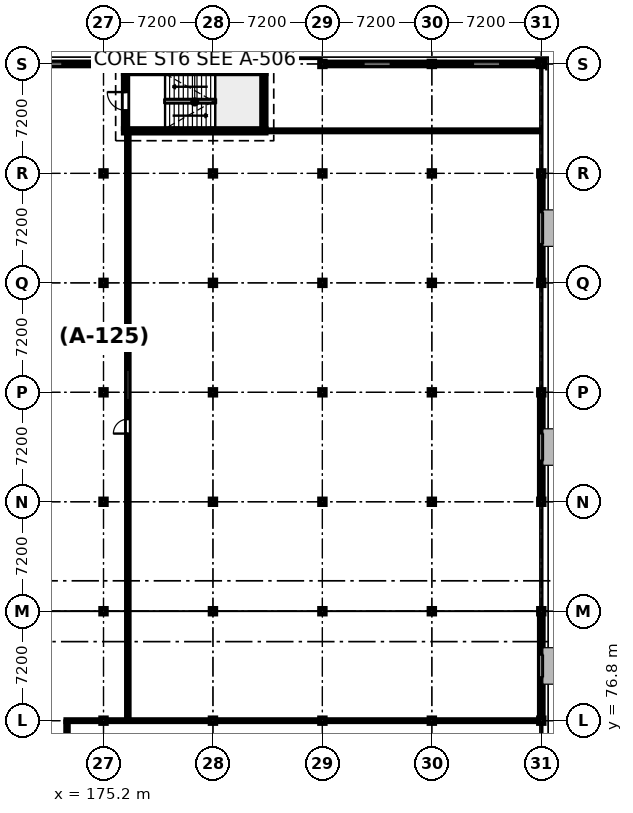
"""IFC4 building model, lengths in metres.
Left out: names, types, materials, properties, quantities, classifications, styles, units other than length and angle.
Written with IfcOpenShell. Run it as: python <this file> out.ifc"""

import sys

from ifc_helpers import new_model, si_unit, direction, frame, frame_2d, origin, origin_2d, place, context, subcontext, project, spatial, rectangle, i_section, extrude, element, fill, save


model = new_model("IFC4")
c1 = context("Model", 3, precision=1e-05, world=origin(), true_north=direction((0.0, 1.0)))
c2 = subcontext(c1, "Body", "Model", "MODEL_VIEW")
j1 = project(units=[si_unit("LENGTHUNIT", "METRE"), si_unit("PLANEANGLEUNIT", "RADIAN")], contexts=[c1])
p1 = place(None, origin())
s1 = spatial("IfcSite", under=j1, at=p1, CompositionType="ELEMENT")
p2 = place(p1, origin())
s2 = spatial("IfcBuilding", under=s1, at=p2, CompositionType="ELEMENT")
p3 = place(p2, frame((0.0, 0.0, 5.4)))
s3 = spatial("IfcBuildingStorey", under=s2, at=p3, CompositionType="ELEMENT", Elevation=5.4)
for number, where, z_axis, x_axis in (
    (1, (175.2, 76.8, 0.0), (0.0, 0.0, 1.0), (1.0, 0.0, 0.0)),
    (2, (175.2, 84.0, 0.0), (0.0, 0.0, 1.0), (1.0, 0.0, 0.0)),
    (3, (175.2, 91.2, 0.0), (0.0, 0.0, 1.0), (1.0, 0.0, 0.0)),
    (4, (175.2, 98.4, 0.0), (0.0, 0.0, 1.0), (1.0, 0.0, 0.0)),
    (5, (175.2, 105.6, 0.0), (0.0, 0.0, 1.0), (1.0, 0.0, 0.0)),
    (6, (175.2, 112.8, 0.0), (0.0, 0.0, 1.0), (1.0, 0.0, 0.0)),
    (7, (175.2, 120.0, 0.0), (0.0, 0.0, 1.0), (1.0, 0.0, 0.0)),
    (8, (182.4, 76.8, 0.0), (0.0, 0.0, 1.0), (1.0, 0.0, 0.0)),
    (9, (182.4, 84.0, 0.0), (0.0, 0.0, 1.0), (1.0, 0.0, 0.0)),
    (10, (182.4, 91.2, 0.0), (0.0, 0.0, 1.0), (1.0, 0.0, 0.0)),
    (11, (182.4, 98.4, 0.0), (0.0, 0.0, 1.0), (1.0, 0.0, 0.0)),
    (12, (182.4, 105.6, 0.0), (0.0, 0.0, 1.0), (1.0, 0.0, 0.0)),
    (13, (182.4, 112.8, 0.0), (0.0, 0.0, 1.0), (1.0, 0.0, 0.0)),
    (14, (182.4, 120.0, 0.0), (0.0, 0.0, 1.0), (1.0, 0.0, 0.0)),
    (15, (189.6, 76.8, 0.0), (0.0, 0.0, 1.0), (1.0, 0.0, 0.0)),
    (16, (189.6, 84.0, 0.0), (0.0, 0.0, 1.0), (1.0, 0.0, 0.0)),
    (17, (189.6, 91.2, 0.0), (0.0, 0.0, 1.0), (1.0, 0.0, 0.0)),
    (18, (189.6, 98.4, 0.0), (0.0, 0.0, 1.0), (1.0, 0.0, 0.0)),
    (19, (189.6, 105.6, 0.0), (0.0, 0.0, 1.0), (1.0, 0.0, 0.0)),
    (20, (189.6, 112.8, 0.0), (0.0, 0.0, 1.0), (1.0, 0.0, 0.0)),
    (21, (189.6, 120.0, 0.0), (0.0, 0.0, 1.0), (1.0, 0.0, 0.0)),
    (22, (196.8, 76.8, 0.0), (0.0, 0.0, 1.0), (1.0, 0.0, 0.0)),
    (23, (196.8, 84.0, 0.0), (0.0, 0.0, 1.0), (1.0, 0.0, 0.0)),
    (24, (196.8, 91.2, 0.0), (0.0, 0.0, 1.0), (1.0, 0.0, 0.0)),
    (25, (196.8, 98.4, 0.0), (0.0, 0.0, 1.0), (1.0, 0.0, 0.0)),
    (26, (196.8, 105.6, 0.0), (0.0, 0.0, 1.0), (1.0, 0.0, 0.0)),
    (27, (196.8, 112.8, 0.0), (0.0, 0.0, 1.0), (1.0, 0.0, 0.0)),
    (28, (196.8, 120.0, 0.0), (0.0, 0.0, 1.0), (1.0, 0.0, 0.0)),
    (29, (204.0, 76.8, 0.0), (0.0, 0.0, 1.0), (1.0, 0.0, 0.0)),
    (30, (204.0, 84.0, 0.0), (0.0, 0.0, 1.0), (1.0, 0.0, 0.0)),
    (31, (204.0, 91.2, 0.0), (0.0, 0.0, 1.0), (1.0, 0.0, 0.0)),
    (32, (204.0, 98.4, 0.0), (0.0, 0.0, 1.0), (1.0, 0.0, 0.0)),
    (33, (204.0, 105.6, 0.0), (0.0, 0.0, 1.0), (1.0, 0.0, 0.0)),
    (34, (204.0, 112.8, 0.0), (0.0, 0.0, 1.0), (1.0, 0.0, 0.0)),
    (35, (204.0, 120.0, 0.0), (0.0, 0.0, 1.0), (1.0, 0.0, 0.0)),
):
    element("IfcColumn", number, at=place(p3, frame(where, z_axis=z_axis, x_axis=x_axis)), inside=s3, PredefinedType="COLUMN", context=c2, shape_type="SweptSolid", body=[
        extrude(i_section(OverallWidth=0.373, OverallDepth=0.373, WebThickness=0.016, FlangeThickness=0.026, FilletRadius=0.015, at=origin_2d()), origin(), (0.0, 0.0, 1.0), 3.9),
    ])
p4 = place(p3, frame((204.0, 83.812, 0.0), z_axis=(0.0, 0.0, 1.0), x_axis=(0.0, -1.0, 0.0)))
e36 = element("IfcWall", 36, at=p4, inside=s3, PredefinedType="STANDARD", context=c2, shape_type="SweptSolid", body=[
    extrude(rectangle(XDim=6.824, YDim=0.26, at=frame_2d((3.412, 0.0))), origin(), (0.0, 0.0, 1.0), 3.043),
])
p5 = place(p4, frame((2.662, 0.0, 0.9)))
e37 = element("IfcOpeningElement", 37, at=p5, cuts=e36, PredefinedType="OPENING", context=c2, shape_type="SweptSolid", body=[
    extrude(rectangle(XDim=1.5, YDim=1.5, at=frame_2d((0.75, 0.75))), frame((0.0, 0.14, 0.0), z_axis=(0.0, -1.0, 0.0), x_axis=(1.0, 0.0, 0.0)), (0.0, 0.0, 1.0), 0.28),
])
p6 = place(p3, frame((204.0, 98.212, 0.0), z_axis=(0.0, 0.0, 1.0), x_axis=(0.0, -1.0, 0.0)))
e38 = element("IfcWall", 38, at=p6, inside=s3, PredefinedType="STANDARD", context=c2, shape_type="SweptSolid", body=[
    extrude(rectangle(XDim=6.824, YDim=0.26, at=frame_2d((3.412, 0.0))), origin(), (0.0, 0.0, 1.0), 3.043),
])
p7 = place(p6, frame((2.512, 0.0, 0.9)))
e39 = element("IfcOpeningElement", 39, at=p7, cuts=e38, PredefinedType="OPENING", context=c2, shape_type="SweptSolid", body=[
    extrude(rectangle(XDim=1.8, YDim=1.5, at=frame_2d((0.9, 0.75))), frame((0.0, 0.14, 0.0), z_axis=(0.0, -1.0, 0.0), x_axis=(1.0, 0.0, 0.0)), (0.0, 0.0, 1.0), 0.28),
])
p8 = place(p3, frame((204.0, 112.612, 0.0), z_axis=(0.0, 0.0, 1.0), x_axis=(0.0, -1.0, 0.0)))
e40 = element("IfcWall", 40, at=p8, inside=s3, PredefinedType="STANDARD", context=c2, shape_type="SweptSolid", body=[
    extrude(rectangle(XDim=6.824, YDim=0.26, at=frame_2d((3.412, 0.0))), origin(), (0.0, 0.0, 1.0), 3.043),
])
p9 = place(p8, frame((2.362, 0.0, 0.9)))
e41 = element("IfcOpeningElement", 41, at=p9, cuts=e40, PredefinedType="OPENING", context=c2, shape_type="SweptSolid", body=[
    extrude(rectangle(XDim=2.1, YDim=1.5, at=frame_2d((1.05, 0.75))), frame((0.0, 0.14, 0.0), z_axis=(0.0, -1.0, 0.0), x_axis=(1.0, 0.0, 0.0)), (0.0, 0.0, 1.0), 0.28),
])
p10 = place(p3, frame((168.194, 120.0, 0.0), z_axis=(0.0, 0.0, 1.0), x_axis=(1.0, 0.0, 0.0)))
e42 = element("IfcWall", 42, at=p10, inside=s3, PredefinedType="STANDARD", context=c2, shape_type="SweptSolid", body=[
    extrude(rectangle(XDim=6.812, YDim=0.26, at=frame_2d((3.406, 0.0))), origin(), (0.0, 0.0, 1.0), 3.043),
])
p11 = place(p10, frame((2.506, 0.0, 0.9)))
e43 = element("IfcOpeningElement", 43, at=p11, cuts=e42, PredefinedType="OPENING", context=c2, shape_type="SweptSolid", body=[
    extrude(rectangle(XDim=1.8, YDim=1.5, at=frame_2d((0.9, 0.75))), frame((0.0, 0.14, 0.0), z_axis=(0.0, -1.0, 0.0), x_axis=(1.0, 0.0, 0.0)), (0.0, 0.0, 1.0), 0.28),
])
p12 = place(p3, frame((189.794, 120.0, 0.0), z_axis=(0.0, 0.0, 1.0), x_axis=(1.0, 0.0, 0.0)))
e44 = element("IfcWall", 44, at=p12, inside=s3, PredefinedType="STANDARD", context=c2, shape_type="SweptSolid", body=[
    extrude(rectangle(XDim=6.812, YDim=0.26, at=frame_2d((3.406, 0.0))), origin(), (0.0, 0.0, 1.0), 3.043),
])
p13 = place(p12, frame((2.506, 0.0, 0.9)))
e45 = element("IfcOpeningElement", 45, at=p13, cuts=e44, PredefinedType="OPENING", context=c2, shape_type="SweptSolid", body=[
    extrude(rectangle(XDim=1.8, YDim=1.5, at=frame_2d((0.9, 0.75))), frame((0.0, 0.14, 0.0), z_axis=(0.0, -1.0, 0.0), x_axis=(1.0, 0.0, 0.0)), (0.0, 0.0, 1.0), 0.28),
])
p14 = place(p3, frame((196.994, 120.0, 0.0), z_axis=(0.0, 0.0, 1.0), x_axis=(1.0, 0.0, 0.0)))
e46 = element("IfcWall", 46, at=p14, inside=s3, PredefinedType="STANDARD", context=c2, shape_type="SweptSolid", body=[
    extrude(rectangle(XDim=6.812, YDim=0.26, at=frame_2d((3.406, 0.0))), origin(), (0.0, 0.0, 1.0), 3.043),
])
p15 = place(p14, frame((2.506, 0.0, 0.9)))
e47 = element("IfcOpeningElement", 47, at=p15, cuts=e46, PredefinedType="OPENING", context=c2, shape_type="SweptSolid", body=[
    extrude(rectangle(XDim=1.8, YDim=1.5, at=frame_2d((0.9, 0.75))), frame((0.0, 0.14, 0.0), z_axis=(0.0, -1.0, 0.0), x_axis=(1.0, 0.0, 0.0)), (0.0, 0.0, 1.0), 0.28),
])
for number, where, z_axis, x_axis in (
    (48, (185.9, 115.6, 0.0), (0.0, 0.0, 1.0), (-1.0, 0.0, 0.0)),
    (49, (176.5, 119.5, 0.0), (0.0, 0.0, 1.0), (1.0, 0.0, 0.0)),
):
    element("IfcWall", number, at=place(p3, frame(where, z_axis=z_axis, x_axis=x_axis)), inside=s3, PredefinedType="SOLIDWALL", context=c2, shape_type="SweptSolid", body=[
        extrude(rectangle(XDim=9.4, YDim=0.3, at=frame_2d((4.7, 0.0))), origin(), (0.0, 0.0, 1.0), 3.67),
    ])
p16 = place(p3, frame((176.65, 115.75, 0.0), z_axis=(0.0, 0.0, 1.0), x_axis=(0.0, 1.0, 0.0)))
e50 = element("IfcWall", 50, at=p16, inside=s3, PredefinedType="SOLIDWALL", context=c2, shape_type="SweptSolid", body=[
    extrude(rectangle(XDim=3.6, YDim=0.3, at=frame_2d((1.8, 0.0))), origin(), (0.0, 0.0, 1.0), 3.67),
])
p17 = place(p16, frame((1.2, 0.0, 0.0)))
e51 = element("IfcOpeningElement", 51, at=p17, cuts=e50, PredefinedType="OPENING", context=c2, shape_type="SweptSolid", body=[
    extrude(rectangle(XDim=1.2, YDim=2.2, at=frame_2d((0.6, 1.1))), frame((0.0, 0.16, 0.0), z_axis=(0.0, -1.0, 0.0), x_axis=(1.0, 0.0, 0.0)), (0.0, 0.0, 1.0), 0.32),
])
p18 = place(p3, frame((185.75, 119.35, 0.0), z_axis=(0.0, 0.0, 1.0), x_axis=(0.0, -1.0, 0.0)))
e52 = element("IfcWall", 52, at=p18, inside=s3, PredefinedType="SOLIDWALL", context=c2, shape_type="SweptSolid", body=[
    extrude(rectangle(XDim=3.6, YDim=0.3, at=frame_2d((1.8, 0.0))), origin(), (0.0, 0.0, 1.0), 3.67),
])
p19 = place(p3, frame((172.72, 76.8, 0.0), z_axis=(0.0, 0.0, 1.0), x_axis=(1.0, 0.0, 0.0)))
e53 = element("IfcWall", 53, at=p19, inside=s3, PredefinedType="PARTITIONING", context=c2, shape_type="SweptSolid", body=[
    extrude(rectangle(XDim=31.148, YDim=0.14, at=frame_2d((15.574, 0.0))), origin(), (0.0, 0.0, 1.0), 3.038),
])
p20 = place(p3, frame((185.902, 115.6, 0.0), z_axis=(0.0, 0.0, 1.0), x_axis=(1.0, 0.0, 0.0)))
e54 = element("IfcWall", 54, at=p20, inside=s3, PredefinedType="PARTITIONING", context=c2, shape_type="SweptSolid", body=[
    extrude(rectangle(XDim=17.966, YDim=0.145, at=frame_2d((8.983, 0.0))), origin(), (0.0, 0.0, 1.0), 3.038),
])
p21 = place(p3, frame((172.8, 56.47, 0.0), z_axis=(0.0, 0.0, 1.0), x_axis=(0.0, 1.0, 0.0)))
e55 = element("IfcWall", 55, at=p21, inside=s3, PredefinedType="PARTITIONING", context=c2, shape_type="SweptSolid", body=[
    extrude(rectangle(XDim=20.258, YDim=0.178, at=frame_2d((10.129, 0.0))), origin(), (0.0, 0.0, 1.0), 3.038),
])
p22 = place(p21, frame((9.229, 0.0, 0.0)))
e56 = element("IfcOpeningElement", 56, at=p22, cuts=e55, PredefinedType="OPENING", context=c2, shape_type="SweptSolid", body=[
    extrude(rectangle(XDim=1.8, YDim=2.28, at=frame_2d((0.9, 1.14))), frame((0.0, 0.099, 0.0), z_axis=(0.0, -1.0, 0.0), x_axis=(1.0, 0.0, 0.0)), (0.0, 0.0, 1.0), 0.198),
])
p23 = place(p21, frame((12.279, 0.0, 0.95)))
e57 = element("IfcOpeningElement", 57, at=p23, cuts=e55, PredefinedType="OPENING", context=c2, shape_type="SweptSolid", body=[
    extrude(rectangle(XDim=1.6, YDim=1.45, at=frame_2d((0.8, 0.725))), frame((0.0, 0.099, 0.0), z_axis=(0.0, -1.0, 0.0), x_axis=(1.0, 0.0, 0.0)), (0.0, 0.0, 1.0), 0.198),
])
p24 = place(p3, frame((176.8, 76.872, 0.0), z_axis=(0.0, 0.0, 1.0), x_axis=(0.0, 1.0, 0.0)))
e58 = element("IfcWall", 58, at=p24, inside=s3, PredefinedType="PARTITIONING", context=c2, shape_type="SweptSolid", body=[
    extrude(rectangle(XDim=38.576, YDim=0.185, at=frame_2d((19.288, 0.0))), origin(), (0.0, 0.0, 1.0), 3.038),
])
p25 = place(p24, frame((18.813, 0.0, 0.0)))
e59 = element("IfcOpeningElement", 59, at=p25, cuts=e58, PredefinedType="OPENING", context=c2, shape_type="SweptSolid", body=[
    extrude(rectangle(XDim=0.95, YDim=2.34, at=frame_2d((0.475, 1.17))), frame((0.0, 0.103, 0.0), z_axis=(0.0, -1.0, 0.0), x_axis=(1.0, 0.0, 0.0)), (0.0, 0.0, 1.0), 0.205),
])
p26 = place(p24, frame((21.013, 0.0, 0.95)))
e60 = element("IfcOpeningElement", 60, at=p26, cuts=e58, PredefinedType="OPENING", context=c2, shape_type="SweptSolid", body=[
    extrude(rectangle(XDim=2.0, YDim=1.45, at=frame_2d((1.0, 0.725))), frame((0.0, 0.103, 0.0), z_axis=(0.0, -1.0, 0.0), x_axis=(1.0, 0.0, 0.0)), (0.0, 0.0, 1.0), 0.205),
])
p27 = place(p5, origin())
e61 = element("IfcWindow", 61, at=p27, inside=s3, PartitioningType="SINGLE_PANEL", PredefinedType="WINDOW", context=c2, shape_type="SweptSolid", body=[
    extrude(rectangle(XDim=1.5, YDim=1.5, at=frame_2d((0.75, 0.75))), frame((0.0, 0.03, 0.0), z_axis=(0.0, -1.0, 0.0), x_axis=(1.0, 0.0, 0.0)), (0.0, 0.0, 1.0), 0.06),
])
fill(e37, e61)
p28 = place(p7, origin())
e62 = element("IfcWindow", 62, at=p28, inside=s3, PartitioningType="SINGLE_PANEL", PredefinedType="WINDOW", context=c2, shape_type="SweptSolid", body=[
    extrude(rectangle(XDim=1.8, YDim=1.5, at=frame_2d((0.9, 0.75))), frame((0.0, 0.03, 0.0), z_axis=(0.0, -1.0, 0.0), x_axis=(1.0, 0.0, 0.0)), (0.0, 0.0, 1.0), 0.06),
])
fill(e39, e62)
p29 = place(p9, origin())
e63 = element("IfcWindow", 63, at=p29, inside=s3, PartitioningType="SINGLE_PANEL", PredefinedType="WINDOW", context=c2, shape_type="SweptSolid", body=[
    extrude(rectangle(XDim=2.1, YDim=1.5, at=frame_2d((1.05, 0.75))), frame((0.0, 0.03, 0.0), z_axis=(0.0, -1.0, 0.0), x_axis=(1.0, 0.0, 0.0)), (0.0, 0.0, 1.0), 0.06),
])
fill(e41, e63)
p30 = place(p11, origin())
e64 = element("IfcWindow", 64, at=p30, inside=s3, PartitioningType="SINGLE_PANEL", PredefinedType="WINDOW", context=c2, shape_type="SweptSolid", body=[
    extrude(rectangle(XDim=1.8, YDim=1.5, at=frame_2d((0.9, 0.75))), frame((0.0, 0.03, 0.0), z_axis=(0.0, -1.0, 0.0), x_axis=(1.0, 0.0, 0.0)), (0.0, 0.0, 1.0), 0.06),
])
fill(e43, e64)
p31 = place(p13, origin())
e65 = element("IfcWindow", 65, at=p31, inside=s3, PartitioningType="SINGLE_PANEL", PredefinedType="WINDOW", context=c2, shape_type="SweptSolid", body=[
    extrude(rectangle(XDim=1.8, YDim=1.5, at=frame_2d((0.9, 0.75))), frame((0.0, 0.03, 0.0), z_axis=(0.0, -1.0, 0.0), x_axis=(1.0, 0.0, 0.0)), (0.0, 0.0, 1.0), 0.06),
])
fill(e45, e65)
p32 = place(p15, origin())
e66 = element("IfcWindow", 66, at=p32, inside=s3, PartitioningType="SINGLE_PANEL", PredefinedType="WINDOW", context=c2, shape_type="SweptSolid", body=[
    extrude(rectangle(XDim=1.8, YDim=1.5, at=frame_2d((0.9, 0.75))), frame((0.0, 0.03, 0.0), z_axis=(0.0, -1.0, 0.0), x_axis=(1.0, 0.0, 0.0)), (0.0, 0.0, 1.0), 0.06),
])
fill(e47, e66)
p33 = place(p17, origin())
e67 = element("IfcDoor", 67, at=p33, inside=s3, OperationType="SINGLE_SWING_RIGHT", PredefinedType="DOOR", context=c2, shape_type="SweptSolid", body=[
    extrude(rectangle(XDim=1.2, YDim=2.2, at=frame_2d((0.6, 1.1))), frame((0.0, 0.025, 0.0), z_axis=(0.0, -1.0, 0.0), x_axis=(1.0, 0.0, 0.0)), (0.0, 0.0, 1.0), 0.05),
])
fill(e51, e67)
p34 = place(p25, origin())
e68 = element("IfcDoor", 68, at=p34, inside=s3, OperationType="SINGLE_SWING_LEFT", PredefinedType="DOOR", context=c2, shape_type="SweptSolid", body=[
    extrude(rectangle(XDim=0.95, YDim=2.34, at=frame_2d((0.475, 1.17))), frame((0.0, 0.025, 0.0), z_axis=(0.0, -1.0, 0.0), x_axis=(1.0, 0.0, 0.0)), (0.0, 0.0, 1.0), 0.05),
])
fill(e59, e68)
p35 = place(p26, origin())
e69 = element("IfcWindow", 69, at=p35, inside=s3, PartitioningType="SINGLE_PANEL", PredefinedType="WINDOW", context=c2, shape_type="SweptSolid", body=[
    extrude(rectangle(XDim=2.0, YDim=1.45, at=frame_2d((1.0, 0.725))), frame((0.0, 0.03, 0.0), z_axis=(0.0, -1.0, 0.0), x_axis=(1.0, 0.0, 0.0)), (0.0, 0.0, 1.0), 0.06),
])
fill(e60, e69)
save(model, sys.argv[1])
